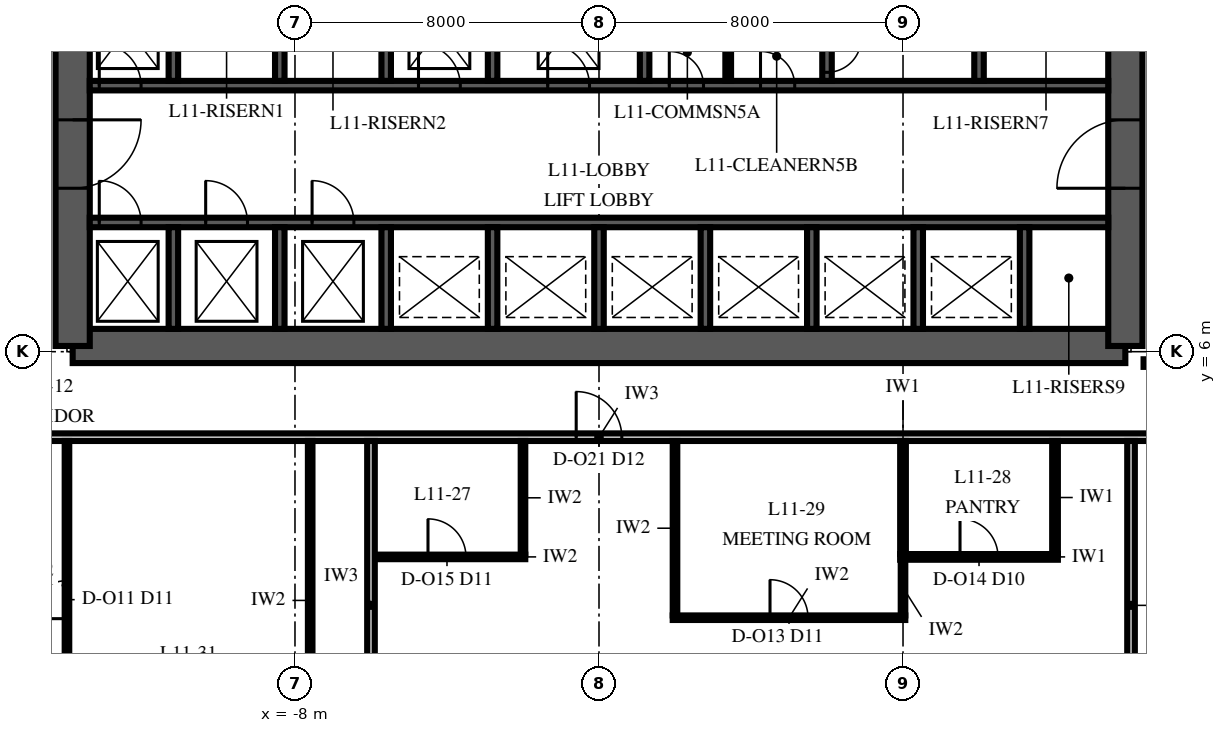
"""IFC4 building model, lengths in metres.
Left out: names, types, materials, properties, quantities, classifications, styles, units other than length and angle.
Written with IfcOpenShell. Run it as: python <this file> out.ifc"""

import sys

from ifc_helpers import new_model, si_unit, direction, frame, frame_2d, origin, place, context, subcontext, project, spatial, polyline, rectangle, outline, extrude, element, fill, save


model = new_model("IFC4")
c1 = context("Model", 3, precision=1e-05, world=origin(), true_north=direction((0.0, 1.0)))
c2 = subcontext(c1, "Body", "Model", "MODEL_VIEW")
j1 = project(units=[si_unit("LENGTHUNIT", "METRE"), si_unit("PLANEANGLEUNIT", "RADIAN")], contexts=[c1])
p1 = place(None, origin())
s1 = spatial("IfcSite", under=j1, at=p1, CompositionType="ELEMENT")
p2 = place(p1, origin())
s2 = spatial("IfcBuilding", under=s1, at=p2, CompositionType="ELEMENT")
p3 = place(p2, frame((0.0, 0.0, 56.0)))
s3 = spatial("IfcBuildingStorey", under=s2, at=p3, CompositionType="ELEMENT", Elevation=56.0)
p4 = place(p3, frame((-13.85, 6.15, 0.0), z_axis=(0.0, 0.0, 1.0), x_axis=(1.0, 0.0, 0.0)))
e1 = element("IfcWall", 1, at=p4, inside=s3, PredefinedType="SHEAR", context=c2, shape_type="SweptSolid", body=[
    extrude(rectangle(XDim=27.7, YDim=0.9, at=frame_2d((13.85, 0.0))), origin(), (0.0, 0.0, 1.0), 4.0),
])
p5 = place(p3, frame((13.85, 6.15, 0.0), z_axis=(0.0, 0.0, 1.0), x_axis=(0.0, 1.0, 0.0)))
e2 = element("IfcWall", 2, at=p5, inside=s3, PredefinedType="SHEAR", context=c2, shape_type="SweptSolid", body=[
    extrude(outline(polyline([(0.0, -0.45), (17.7, -0.45), (17.7, 0.0), (17.25, 0.0), (17.25, 0.45), (0.45, 0.45), (0.45, 0.0), (0.0, 0.0), (0.0, -0.45)])), origin(), (0.0, 0.0, 1.0), 4.0),
])
p6 = place(p5, frame((4.15, 0.0, 0.0)))
e3 = element("IfcOpeningElement", 3, at=p6, cuts=e2, PredefinedType="OPENING", context=c2, shape_type="SweptSolid", body=[
    extrude(rectangle(XDim=1.8, YDim=2.4, at=frame_2d((0.9, 1.2))), frame((0.0, 0.465, 0.0), z_axis=(0.0, -1.0, 0.0), x_axis=(1.0, 0.0, 0.0)), (0.0, 0.0, 1.0), 0.93),
])
p7 = place(p3, frame((-13.85, 23.85, 0.0), z_axis=(0.0, 0.0, 1.0), x_axis=(0.0, -1.0, 0.0)))
e4 = element("IfcWall", 4, at=p7, inside=s3, PredefinedType="SHEAR", context=c2, shape_type="SweptSolid", body=[
    extrude(outline(polyline([(0.0, -0.45), (17.7, -0.45), (17.7, 0.0), (17.25, 0.0), (17.25, 0.45), (0.45, 0.45), (0.45, 0.0), (0.0, 0.0), (0.0, -0.45)])), origin(), (0.0, 0.0, 1.0), 4.0),
])
p8 = place(p7, frame((11.75, 0.0, 0.0)))
e5 = element("IfcOpeningElement", 5, at=p8, cuts=e4, PredefinedType="OPENING", context=c2, shape_type="SweptSolid", body=[
    extrude(rectangle(XDim=1.8, YDim=2.4, at=frame_2d((0.9, 1.2))), frame((0.0, 0.465, 0.0), z_axis=(0.0, -1.0, 0.0), x_axis=(1.0, 0.0, 0.0)), (0.0, 0.0, 1.0), 0.93),
])
p9 = place(p3, frame((-13.4, 9.4, 0.0), z_axis=(0.0, 0.0, 1.0), x_axis=(1.0, 0.0, 0.0)))
e6 = element("IfcWall", 6, at=p9, inside=s3, PredefinedType="SHEAR", context=c2, shape_type="SweptSolid", body=[
    extrude(rectangle(XDim=26.8, YDim=0.25, at=frame_2d((13.4, 0.0))), origin(), (0.0, 0.0, 1.0), 4.0),
])
p10 = place(p9, frame((0.25, 0.0, 0.0)))
e7 = element("IfcOpeningElement", 7, at=p10, cuts=e6, PredefinedType="OPENING", context=c2, shape_type="SweptSolid", body=[
    extrude(rectangle(XDim=1.1, YDim=2.1, at=frame_2d((0.55, 1.05))), frame((0.0, 0.14, 0.0), z_axis=(0.0, -1.0, 0.0), x_axis=(1.0, 0.0, 0.0)), (0.0, 0.0, 1.0), 0.28),
])
p11 = place(p9, frame((3.05, 0.0, 0.0)))
e8 = element("IfcOpeningElement", 8, at=p11, cuts=e6, PredefinedType="OPENING", context=c2, shape_type="SweptSolid", body=[
    extrude(rectangle(XDim=1.1, YDim=2.1, at=frame_2d((0.55, 1.05))), frame((0.0, 0.14, 0.0), z_axis=(0.0, -1.0, 0.0), x_axis=(1.0, 0.0, 0.0)), (0.0, 0.0, 1.0), 0.28),
])
p12 = place(p9, frame((5.85, 0.0, 0.0)))
e9 = element("IfcOpeningElement", 9, at=p12, cuts=e6, PredefinedType="OPENING", context=c2, shape_type="SweptSolid", body=[
    extrude(rectangle(XDim=1.1, YDim=2.1, at=frame_2d((0.55, 1.05))), frame((0.0, 0.14, 0.0), z_axis=(0.0, -1.0, 0.0), x_axis=(1.0, 0.0, 0.0)), (0.0, 0.0, 1.0), 0.28),
])
p13 = place(p3, frame((-13.4, 13.0, 0.0), z_axis=(0.0, 0.0, 1.0), x_axis=(1.0, 0.0, 0.0)))
e10 = element("IfcWall", 10, at=p13, inside=s3, PredefinedType="SHEAR", context=c2, shape_type="SweptSolid", body=[
    extrude(rectangle(XDim=26.8, YDim=0.25, at=frame_2d((13.4, 0.0))), origin(), (0.0, 0.0, 1.0), 4.0),
])
p14 = place(p13, frame((0.25, 0.0, 0.0)))
e11 = element("IfcOpeningElement", 11, at=p14, cuts=e10, PredefinedType="OPENING", context=c2, shape_type="SweptSolid", body=[
    extrude(rectangle(XDim=1.1, YDim=2.1, at=frame_2d((0.55, 1.05))), frame((0.0, 0.14, 0.0), z_axis=(0.0, -1.0, 0.0), x_axis=(1.0, 0.0, 0.0)), (0.0, 0.0, 1.0), 0.28),
])
p15 = place(p13, frame((8.65, 0.0, 0.0)))
e12 = element("IfcOpeningElement", 12, at=p15, cuts=e10, PredefinedType="OPENING", context=c2, shape_type="SweptSolid", body=[
    extrude(rectangle(XDim=1.1, YDim=2.1, at=frame_2d((0.55, 1.05))), frame((0.0, 0.14, 0.0), z_axis=(0.0, -1.0, 0.0), x_axis=(1.0, 0.0, 0.0)), (0.0, 0.0, 1.0), 0.28),
])
p16 = place(p13, frame((12.05, 0.0, 0.0)))
e13 = element("IfcOpeningElement", 13, at=p16, cuts=e10, PredefinedType="OPENING", context=c2, shape_type="SweptSolid", body=[
    extrude(rectangle(XDim=1.1, YDim=2.1, at=frame_2d((0.55, 1.05))), frame((0.0, 0.14, 0.0), z_axis=(0.0, -1.0, 0.0), x_axis=(1.0, 0.0, 0.0)), (0.0, 0.0, 1.0), 0.28),
])
p17 = place(p13, frame((15.25, 0.0, 0.0)))
e14 = element("IfcOpeningElement", 14, at=p17, cuts=e10, PredefinedType="OPENING", context=c2, shape_type="SweptSolid", body=[
    extrude(rectangle(XDim=0.9, YDim=2.1, at=frame_2d((0.45, 1.05))), frame((0.0, 0.14, 0.0), z_axis=(0.0, -1.0, 0.0), x_axis=(1.0, 0.0, 0.0)), (0.0, 0.0, 1.0), 0.28),
])
p18 = place(p13, frame((17.65, 0.0, 0.0)))
e15 = element("IfcOpeningElement", 15, at=p18, cuts=e10, PredefinedType="OPENING", context=c2, shape_type="SweptSolid", body=[
    extrude(rectangle(XDim=0.9, YDim=2.1, at=frame_2d((0.45, 1.05))), frame((0.0, 0.14, 0.0), z_axis=(0.0, -1.0, 0.0), x_axis=(1.0, 0.0, 0.0)), (0.0, 0.0, 1.0), 0.28),
])
for number, where, z_axis, x_axis in (
    (16, (-11.2, 6.6, 0.0), (0.0, 0.0, 1.0), (0.0, 1.0, 0.0)),
    (17, (-8.4, 6.6, 0.0), (0.0, 0.0, 1.0), (0.0, 1.0, 0.0)),
    (18, (-5.6, 6.6, 0.0), (0.0, 0.0, 1.0), (0.0, 1.0, 0.0)),
    (19, (-2.8, 6.6, 0.0), (0.0, 0.0, 1.0), (0.0, 1.0, 0.0)),
    (20, (0.0, 6.6, 0.0), (0.0, 0.0, 1.0), (0.0, 1.0, 0.0)),
    (21, (2.8, 6.6, 0.0), (0.0, 0.0, 1.0), (0.0, 1.0, 0.0)),
    (22, (5.6, 6.6, 0.0), (0.0, 0.0, 1.0), (0.0, 1.0, 0.0)),
    (23, (8.4, 6.6, 0.0), (0.0, 0.0, 1.0), (0.0, 1.0, 0.0)),
    (24, (11.2, 6.6, 0.0), (0.0, 0.0, 1.0), (0.0, 1.0, 0.0)),
):
    element("IfcWall", number, at=place(p3, frame(where, z_axis=z_axis, x_axis=x_axis)), inside=s3, PredefinedType="SHEAR", context=c2, shape_type="SweptSolid", body=[
        extrude(rectangle(XDim=2.675, YDim=0.25, at=frame_2d((1.337, 0.0))), origin(), (0.0, 0.0, 1.0), 4.0),
    ])
for number, where, z_axis, x_axis in (
    (25, (-11.2, 13.125, 0.0), (0.0, 0.0, 1.0), (0.0, 1.0, 0.0)),
    (26, (-8.4, 13.125, 0.0), (0.0, 0.0, 1.0), (0.0, 1.0, 0.0)),
    (27, (-5.6, 13.125, 0.0), (0.0, 0.0, 1.0), (0.0, 1.0, 0.0)),
    (28, (-2.8, 13.125, 0.0), (0.0, 0.0, 1.0), (0.0, 1.0, 0.0)),
    (29, (1.2, 13.125, 0.0), (0.0, 0.0, 1.0), (0.0, 1.0, 0.0)),
):
    element("IfcWall", number, at=place(p3, frame(where, z_axis=z_axis, x_axis=x_axis)), inside=s3, PredefinedType="SHEAR", context=c2, shape_type="SweptSolid", body=[
        extrude(rectangle(XDim=2.75, YDim=0.25, at=frame_2d((1.375, 0.0))), origin(), (0.0, 0.0, 1.0), 4.0),
    ])
p19 = place(p3, frame((6.0, 13.125, 0.0), z_axis=(0.0, 0.0, 1.0), x_axis=(0.0, 1.0, 0.0)))
e30 = element("IfcWall", 30, at=p19, inside=s3, PredefinedType="SHEAR", context=c2, shape_type="SweptSolid", body=[
    extrude(rectangle(XDim=2.75, YDim=0.25, at=frame_2d((1.375, 0.0))), origin(), (0.0, 0.0, 1.0), 4.0),
])
p20 = place(p19, frame((0.225, 0.0, 0.0)))
e31 = element("IfcOpeningElement", 31, at=p20, cuts=e30, PredefinedType="OPENING", context=c2, shape_type="SweptSolid", body=[
    extrude(rectangle(XDim=0.9, YDim=2.1, at=frame_2d((0.45, 1.05))), frame((0.0, 0.14, 0.0), z_axis=(0.0, -1.0, 0.0), x_axis=(1.0, 0.0, 0.0)), (0.0, 0.0, 1.0), 0.28),
])
p21 = place(p3, frame((10.0, 13.125, 0.0), z_axis=(0.0, 0.0, 1.0), x_axis=(0.0, 1.0, 0.0)))
e32 = element("IfcWall", 32, at=p21, inside=s3, PredefinedType="SHEAR", context=c2, shape_type="SweptSolid", body=[
    extrude(rectangle(XDim=2.75, YDim=0.25, at=frame_2d((1.375, 0.0))), origin(), (0.0, 0.0, 1.0), 4.0),
])
p22 = place(p3, frame((3.4, 13.125, 0.0), z_axis=(0.0, 0.0, 1.0), x_axis=(0.0, 1.0, 0.0)))
e33 = element("IfcWall", 33, at=p22, inside=s3, PredefinedType="PARTITIONING", context=c2, shape_type="SweptSolid", body=[
    extrude(rectangle(XDim=1.45, YDim=0.15, at=frame_2d((0.725, 0.0))), origin(), (0.0, 0.0, 1.0), 3.85),
])
p23 = place(p3, frame((1.94, -1.0, 0.0), z_axis=(0.0, 0.0, 1.0), x_axis=(1.0, 0.0, 0.0)))
e34 = element("IfcWall", 34, at=p23, inside=s3, PredefinedType="PARTITIONING", context=c2, shape_type="SweptSolid", body=[
    extrude(rectangle(XDim=6.12, YDim=0.12, at=frame_2d((3.06, 0.0))), origin(), (0.0, 0.0, 1.0), 3.25),
])
p24 = place(p23, frame((2.56, 0.0, 0.0)))
e35 = element("IfcOpeningElement", 35, at=p24, cuts=e34, PredefinedType="OPENING", context=c2, shape_type="SweptSolid", body=[
    extrude(rectangle(XDim=1.0, YDim=2.4, at=frame_2d((0.5, 1.2))), frame((0.0, 0.075, 0.0), z_axis=(0.0, -1.0, 0.0), x_axis=(1.0, 0.0, 0.0)), (0.0, 0.0, 1.0), 0.15),
])
p25 = place(p3, frame((-5.9, 0.6, 0.0), z_axis=(0.0, 0.0, 1.0), x_axis=(1.0, 0.0, 0.0)))
e36 = element("IfcWall", 36, at=p25, inside=s3, PredefinedType="PARTITIONING", context=c2, shape_type="SweptSolid", body=[
    extrude(rectangle(XDim=3.96, YDim=0.12, at=frame_2d((1.98, 0.0))), origin(), (0.0, 0.0, 1.0), 3.25),
])
p26 = place(p25, frame((1.4, 0.0, 0.0)))
e37 = element("IfcOpeningElement", 37, at=p26, cuts=e36, PredefinedType="OPENING", context=c2, shape_type="SweptSolid", body=[
    extrude(rectangle(XDim=1.0, YDim=2.4, at=frame_2d((0.5, 1.2))), frame((0.0, 0.075, 0.0), z_axis=(0.0, -1.0, 0.0), x_axis=(1.0, 0.0, 0.0)), (0.0, 0.0, 1.0), 0.15),
])
p27 = place(p3, frame((7.925, 0.6, 0.0), z_axis=(0.0, 0.0, 1.0), x_axis=(1.0, 0.0, 0.0)))
e38 = element("IfcWall", 38, at=p27, inside=s3, PredefinedType="PARTITIONING", context=c2, shape_type="SweptSolid", body=[
    extrude(rectangle(XDim=4.15, YDim=0.15, at=frame_2d((2.075, 0.0))), origin(), (0.0, 0.0, 1.0), 3.25),
])
p28 = place(p27, frame((1.575, 0.0, 0.0)))
e39 = element("IfcOpeningElement", 39, at=p28, cuts=e38, PredefinedType="OPENING", context=c2, shape_type="SweptSolid", body=[
    extrude(rectangle(XDim=1.0, YDim=2.3, at=frame_2d((0.5, 1.15))), frame((0.0, 0.09, 0.0), z_axis=(0.0, -1.0, 0.0), x_axis=(1.0, 0.0, 0.0)), (0.0, 0.0, 1.0), 0.18),
])
p29 = place(p3, frame((-16.35, 3.75, 0.0), z_axis=(0.0, 0.0, 1.0), x_axis=(1.0, 0.0, 0.0)))
e40 = element("IfcWall", 40, at=p29, inside=s3, PredefinedType="PARTITIONING", context=c2, shape_type="SweptSolid", body=[
    extrude(rectangle(XDim=32.7, YDim=0.2, at=frame_2d((16.35, 0.0))), origin(), (0.0, 0.0, 1.0), 3.25),
])
p30 = place(p29, frame((15.75, 0.0, 0.0)))
e41 = element("IfcOpeningElement", 41, at=p30, cuts=e40, PredefinedType="OPENING", context=c2, shape_type="SweptSolid", body=[
    extrude(rectangle(XDim=1.2, YDim=2.4, at=frame_2d((0.6, 1.2))), frame((0.0, 0.115, 0.0), z_axis=(0.0, -1.0, 0.0), x_axis=(1.0, 0.0, 0.0)), (0.0, 0.0, 1.0), 0.23),
])
p31 = place(p3, frame((14.33, 5.7, 0.0), z_axis=(0.0, 0.0, 1.0), x_axis=(1.0, 0.0, 0.0)))
e42 = element("IfcWall", 42, at=p31, inside=s3, PredefinedType="PARTITIONING", context=c2, shape_type="SweptSolid", body=[
    extrude(rectangle(XDim=2.02, YDim=0.2, at=frame_2d((1.01, 0.0))), origin(), (0.0, 0.0, 1.0), 3.85),
])
p32 = place(p3, frame((-14.0, -4.74, 0.0), z_axis=(0.0, 0.0, 1.0), x_axis=(0.0, 1.0, 0.0)))
e43 = element("IfcWall", 43, at=p32, inside=s3, PredefinedType="PARTITIONING", context=c2, shape_type="SweptSolid", body=[
    extrude(rectangle(XDim=8.39, YDim=0.12, at=frame_2d((4.195, 0.0))), origin(), (0.0, 0.0, 1.0), 3.25),
])
p33 = place(p32, frame((3.715, 0.0, 0.0)))
e44 = element("IfcOpeningElement", 44, at=p33, cuts=e43, PredefinedType="OPENING", context=c2, shape_type="SweptSolid", body=[
    extrude(rectangle(XDim=1.0, YDim=2.4, at=frame_2d((0.5, 1.2))), frame((0.0, 0.075, 0.0), z_axis=(0.0, -1.0, 0.0), x_axis=(1.0, 0.0, 0.0)), (0.0, 0.0, 1.0), 0.15),
])
p34 = place(p3, frame((-7.6, -4.74, 0.0), z_axis=(0.0, 0.0, 1.0), x_axis=(0.0, 1.0, 0.0)))
e45 = element("IfcWall", 45, at=p34, inside=s3, PredefinedType="PARTITIONING", context=c2, shape_type="SweptSolid", body=[
    extrude(rectangle(XDim=8.39, YDim=0.12, at=frame_2d((4.195, 0.0))), origin(), (0.0, 0.0, 1.0), 3.85),
])
p35 = place(p3, frame((-6.0, -5.0, 0.0), z_axis=(0.0, 0.0, 1.0), x_axis=(0.0, 1.0, 0.0)))
e46 = element("IfcWall", 46, at=p35, inside=s3, PredefinedType="PARTITIONING", context=c2, shape_type="SweptSolid", body=[
    extrude(rectangle(XDim=8.65, YDim=0.2, at=frame_2d((4.325, 0.0))), origin(), (0.0, 0.0, 1.0), 3.25),
])
p36 = place(p3, frame((-2.0, 0.66, 0.0), z_axis=(0.0, 0.0, 1.0), x_axis=(0.0, 1.0, 0.0)))
e47 = element("IfcWall", 47, at=p36, inside=s3, PredefinedType="PARTITIONING", context=c2, shape_type="SweptSolid", body=[
    extrude(rectangle(XDim=2.99, YDim=0.12, at=frame_2d((1.495, 0.0))), origin(), (0.0, 0.0, 1.0), 3.85),
])
p37 = place(p3, frame((2.0, -0.94, 0.0), z_axis=(0.0, 0.0, 1.0), x_axis=(0.0, 1.0, 0.0)))
e48 = element("IfcWall", 48, at=p37, inside=s3, PredefinedType="PARTITIONING", context=c2, shape_type="SweptSolid", body=[
    extrude(rectangle(XDim=4.59, YDim=0.12, at=frame_2d((2.295, 0.0))), origin(), (0.0, 0.0, 1.0), 3.85),
])
p38 = place(p3, frame((8.0, -0.94, 0.0), z_axis=(0.0, 0.0, 1.0), x_axis=(0.0, 1.0, 0.0)))
e49 = element("IfcWall", 49, at=p38, inside=s3, PredefinedType="PARTITIONING", context=c2, shape_type="SweptSolid", body=[
    extrude(rectangle(XDim=1.465, YDim=0.12, at=frame_2d((0.732, 0.0))), origin(), (0.0, 0.0, 1.0), 3.85),
])
for number, where, z_axis, x_axis in (
    (50, (8.0, 0.675, 0.0), (0.0, 0.0, 1.0), (0.0, 1.0, 0.0)),
    (51, (12.0, 0.675, 0.0), (0.0, 0.0, 1.0), (0.0, 1.0, 0.0)),
):
    element("IfcWall", number, at=place(p3, frame(where, z_axis=z_axis, x_axis=x_axis)), inside=s3, PredefinedType="PARTITIONING", context=c2, shape_type="SweptSolid", body=[
        extrude(rectangle(XDim=2.975, YDim=0.15, at=frame_2d((1.487, 0.0))), origin(), (0.0, 0.0, 1.0), 3.85),
    ])
p39 = place(p3, frame((14.0, -5.0, 0.0), z_axis=(0.0, 0.0, 1.0), x_axis=(0.0, 1.0, 0.0)))
e52 = element("IfcWall", 52, at=p39, inside=s3, PredefinedType="PARTITIONING", context=c2, shape_type="SweptSolid", body=[
    extrude(rectangle(XDim=8.65, YDim=0.2, at=frame_2d((4.325, 0.0))), origin(), (0.0, 0.0, 1.0), 3.25),
])
p40 = place(p6, origin())
e53 = element("IfcDoor", 53, at=p40, inside=s3, OperationType="DOUBLE_DOOR_SINGLE_SWING", PredefinedType="DOOR", context=c2, shape_type="SweptSolid", body=[
    extrude(rectangle(XDim=1.8, YDim=2.4, at=frame_2d((0.9, 1.2))), frame((0.0, 0.45, 0.0), z_axis=(0.0, -1.0, 0.0), x_axis=(1.0, 0.0, 0.0)), (0.0, 0.0, 1.0), 0.899),
])
fill(e3, e53)
p41 = place(p8, origin())
e54 = element("IfcDoor", 54, at=p41, inside=s3, OperationType="DOUBLE_DOOR_SINGLE_SWING", PredefinedType="DOOR", context=c2, shape_type="SweptSolid", body=[
    extrude(rectangle(XDim=1.8, YDim=2.4, at=frame_2d((0.9, 1.2))), frame((0.0, 0.45, 0.0), z_axis=(0.0, -1.0, 0.0), x_axis=(1.0, 0.0, 0.0)), (0.0, 0.0, 1.0), 0.899),
])
fill(e5, e54)
p42 = place(p10, origin())
e55 = element("IfcDoor", 55, at=p42, inside=s3, OperationType="SLIDING_TO_LEFT", PredefinedType="DOOR", context=c2, shape_type="SweptSolid", body=[
    extrude(rectangle(XDim=1.1, YDim=2.1, at=frame_2d((0.55, 1.05))), frame((0.0, 0.125, 0.0), z_axis=(0.0, -1.0, 0.0), x_axis=(1.0, 0.0, 0.0)), (0.0, 0.0, 1.0), 0.25),
])
fill(e7, e55)
p43 = place(p11, origin())
e56 = element("IfcDoor", 56, at=p43, inside=s3, OperationType="SLIDING_TO_LEFT", PredefinedType="DOOR", context=c2, shape_type="SweptSolid", body=[
    extrude(rectangle(XDim=1.1, YDim=2.1, at=frame_2d((0.55, 1.05))), frame((0.0, 0.125, 0.0), z_axis=(0.0, -1.0, 0.0), x_axis=(1.0, 0.0, 0.0)), (0.0, 0.0, 1.0), 0.25),
])
fill(e8, e56)
p44 = place(p12, origin())
e57 = element("IfcDoor", 57, at=p44, inside=s3, OperationType="SLIDING_TO_LEFT", PredefinedType="DOOR", context=c2, shape_type="SweptSolid", body=[
    extrude(rectangle(XDim=1.1, YDim=2.1, at=frame_2d((0.55, 1.05))), frame((0.0, 0.125, 0.0), z_axis=(0.0, -1.0, 0.0), x_axis=(1.0, 0.0, 0.0)), (0.0, 0.0, 1.0), 0.25),
])
fill(e9, e57)
p45 = place(p14, origin())
e58 = element("IfcDoor", 58, at=p45, inside=s3, OperationType="SLIDING_TO_LEFT", PredefinedType="DOOR", context=c2, shape_type="SweptSolid", body=[
    extrude(rectangle(XDim=1.1, YDim=2.1, at=frame_2d((0.55, 1.05))), frame((0.0, 0.125, 0.0), z_axis=(0.0, -1.0, 0.0), x_axis=(1.0, 0.0, 0.0)), (0.0, 0.0, 1.0), 0.25),
])
fill(e11, e58)
p46 = place(p15, origin())
e59 = element("IfcDoor", 59, at=p46, inside=s3, OperationType="SLIDING_TO_LEFT", PredefinedType="DOOR", context=c2, shape_type="SweptSolid", body=[
    extrude(rectangle(XDim=1.1, YDim=2.1, at=frame_2d((0.55, 1.05))), frame((0.0, 0.125, 0.0), z_axis=(0.0, -1.0, 0.0), x_axis=(1.0, 0.0, 0.0)), (0.0, 0.0, 1.0), 0.25),
])
fill(e12, e59)
p47 = place(p16, origin())
e60 = element("IfcDoor", 60, at=p47, inside=s3, OperationType="SLIDING_TO_LEFT", PredefinedType="DOOR", context=c2, shape_type="SweptSolid", body=[
    extrude(rectangle(XDim=1.1, YDim=2.1, at=frame_2d((0.55, 1.05))), frame((0.0, 0.125, 0.0), z_axis=(0.0, -1.0, 0.0), x_axis=(1.0, 0.0, 0.0)), (0.0, 0.0, 1.0), 0.25),
])
fill(e13, e60)
p48 = place(p17, origin())
e61 = element("IfcDoor", 61, at=p48, inside=s3, OperationType="SINGLE_SWING_LEFT", PredefinedType="DOOR", context=c2, shape_type="SweptSolid", body=[
    extrude(rectangle(XDim=0.9, YDim=2.1, at=frame_2d((0.45, 1.05))), frame((0.0, 0.125, 0.0), z_axis=(0.0, -1.0, 0.0), x_axis=(1.0, 0.0, 0.0)), (0.0, 0.0, 1.0), 0.25),
])
fill(e14, e61)
p49 = place(p18, origin())
e62 = element("IfcDoor", 62, at=p49, inside=s3, OperationType="SINGLE_SWING_LEFT", PredefinedType="DOOR", context=c2, shape_type="SweptSolid", body=[
    extrude(rectangle(XDim=0.9, YDim=2.1, at=frame_2d((0.45, 1.05))), frame((0.0, 0.125, 0.0), z_axis=(0.0, -1.0, 0.0), x_axis=(1.0, 0.0, 0.0)), (0.0, 0.0, 1.0), 0.25),
])
fill(e15, e62)
p50 = place(p20, frame((0.9, 0.0, 0.0), z_axis=(0.0, 0.0, 1.0), x_axis=(-1.0, 0.0, 0.0)))
e63 = element("IfcDoor", 63, at=p50, inside=s3, OperationType="SINGLE_SWING_LEFT", PredefinedType="DOOR", context=c2, shape_type="SweptSolid", body=[
    extrude(rectangle(XDim=0.9, YDim=2.1, at=frame_2d((0.45, 1.05))), frame((0.0, 0.125, 0.0), z_axis=(0.0, -1.0, 0.0), x_axis=(1.0, 0.0, 0.0)), (0.0, 0.0, 1.0), 0.25),
])
fill(e31, e63)
p51 = place(p33, origin())
e64 = element("IfcDoor", 64, at=p51, inside=s3, OperationType="SINGLE_SWING_RIGHT", PredefinedType="DOOR", context=c2, shape_type="SweptSolid", body=[
    extrude(rectangle(XDim=1.0, YDim=2.4, at=frame_2d((0.5, 1.2))), frame((0.0, 0.06, 0.0), z_axis=(0.0, -1.0, 0.0), x_axis=(1.0, 0.0, 0.0)), (0.0, 0.0, 1.0), 0.12),
])
fill(e44, e64)
p52 = place(p24, origin())
e65 = element("IfcDoor", 65, at=p52, inside=s3, OperationType="SINGLE_SWING_RIGHT", PredefinedType="DOOR", context=c2, shape_type="SweptSolid", body=[
    extrude(rectangle(XDim=1.0, YDim=2.4, at=frame_2d((0.5, 1.2))), frame((0.0, 0.06, 0.0), z_axis=(0.0, -1.0, 0.0), x_axis=(1.0, 0.0, 0.0)), (0.0, 0.0, 1.0), 0.12),
])
fill(e35, e65)
p53 = place(p28, origin())
e66 = element("IfcDoor", 66, at=p53, inside=s3, OperationType="SINGLE_SWING_LEFT", PredefinedType="DOOR", context=c2, shape_type="SweptSolid", body=[
    extrude(rectangle(XDim=1.0, YDim=2.3, at=frame_2d((0.5, 1.15))), frame((0.0, 0.075, 0.0), z_axis=(0.0, -1.0, 0.0), x_axis=(1.0, 0.0, 0.0)), (0.0, 0.0, 1.0), 0.149),
])
fill(e39, e66)
p54 = place(p26, origin())
e67 = element("IfcDoor", 67, at=p54, inside=s3, OperationType="SINGLE_SWING_RIGHT", PredefinedType="DOOR", context=c2, shape_type="SweptSolid", body=[
    extrude(rectangle(XDim=1.0, YDim=2.4, at=frame_2d((0.5, 1.2))), frame((0.0, 0.06, 0.0), z_axis=(0.0, -1.0, 0.0), x_axis=(1.0, 0.0, 0.0)), (0.0, 0.0, 1.0), 0.12),
])
fill(e37, e67)
p55 = place(p30, origin())
e68 = element("IfcDoor", 68, at=p55, inside=s3, OperationType="SINGLE_SWING_LEFT", PredefinedType="DOOR", context=c2, shape_type="SweptSolid", body=[
    extrude(rectangle(XDim=1.2, YDim=2.4, at=frame_2d((0.6, 1.2))), frame((0.0, 0.1, 0.0), z_axis=(0.0, -1.0, 0.0), x_axis=(1.0, 0.0, 0.0)), (0.0, 0.0, 1.0), 0.199),
])
fill(e41, e68)
save(model, sys.argv[1])
